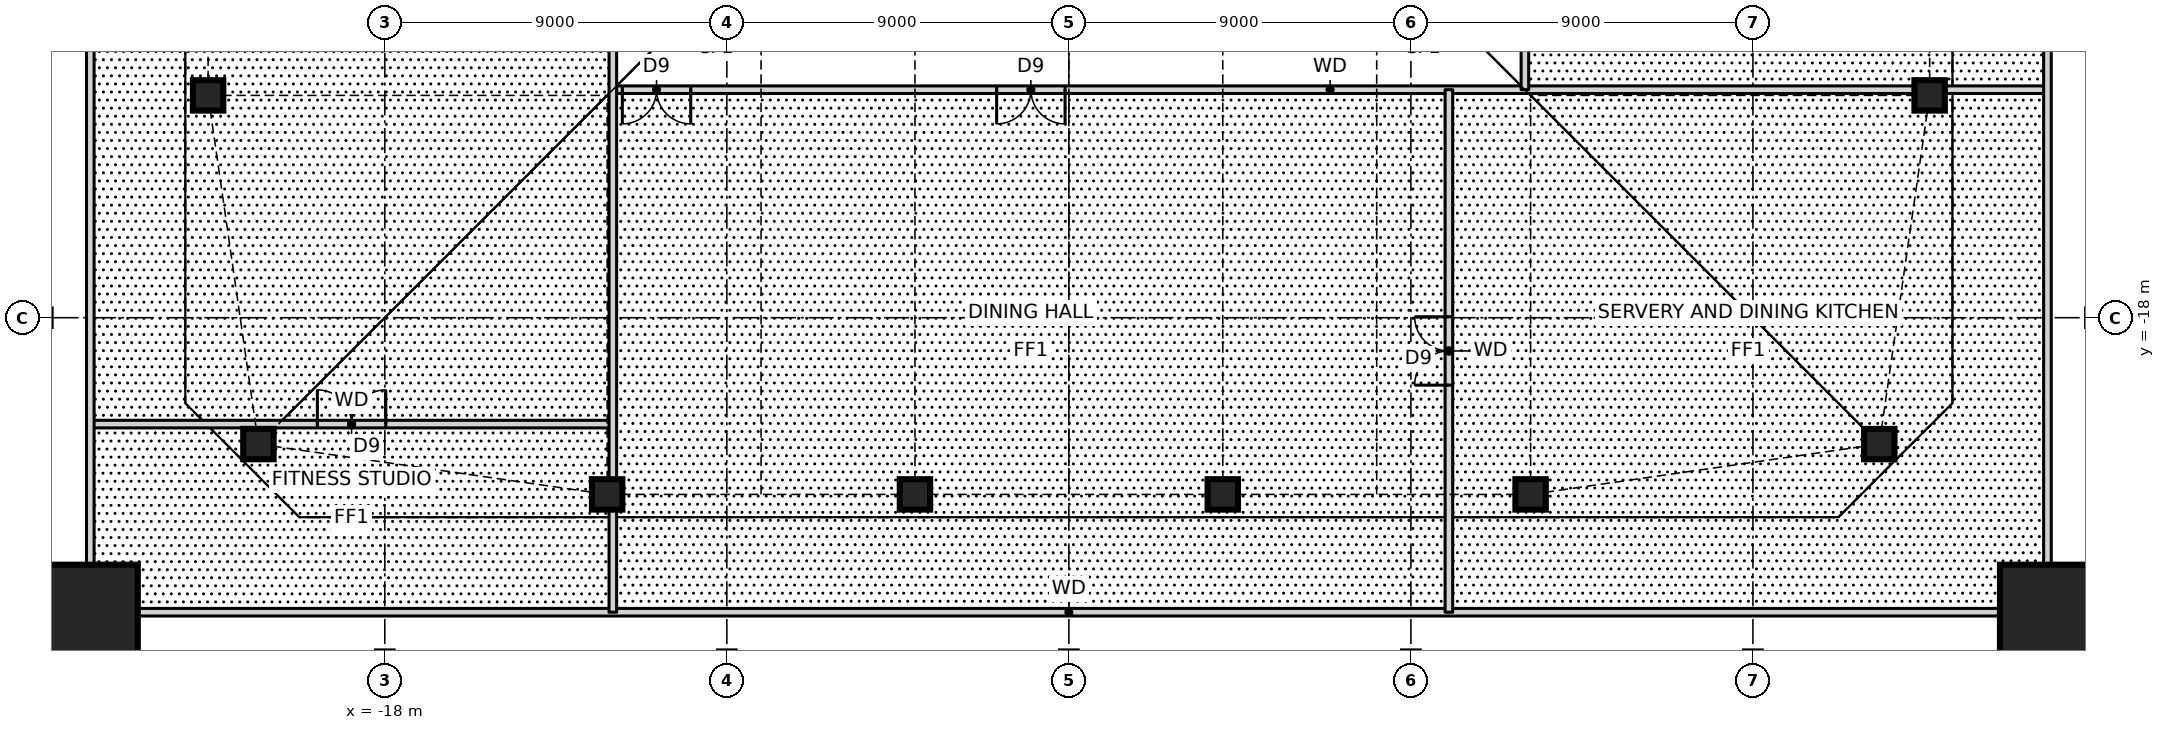
"""IFC4 building model, lengths in metres.
Left out: names, types, materials, properties, quantities, classifications, styles, units other than length and angle.
Written with IfcOpenShell. Run it as: python <this file> out.ifc"""

import sys

from ifc_helpers import new_model, si_unit, direction, frame, frame_2d, origin, origin_2d, place, context, subcontext, project, spatial, rectangle, hollow_rectangle, i_section, extrude, element, fill, save


model = new_model("IFC4")
c1 = context("Model", 3, precision=1e-05, world=origin(), true_north=direction((0.0, 1.0)))
c2 = subcontext(c1, "Body", "Model", "MODEL_VIEW")
j1 = project(units=[si_unit("LENGTHUNIT", "METRE"), si_unit("PLANEANGLEUNIT", "RADIAN")], contexts=[c1])
p1 = place(None, origin())
s1 = spatial("IfcSite", under=j1, at=p1, CompositionType="ELEMENT")
p2 = place(p1, origin())
s2 = spatial("IfcBuilding", under=s1, at=p2, CompositionType="ELEMENT")
p3 = place(p2, frame((0.0, 0.0, 6.0)))
s3 = spatial("IfcBuildingStorey", under=s2, at=p3, CompositionType="ELEMENT", Elevation=6.0)
for number, where, z_axis, x_axis in (
    (1, (-21.326, -21.326, 0.0), (0.0, 0.0, 1.0), (1.0, 0.0, 0.0)),
    (2, (-12.15, -22.65, 0.0), (0.0, 0.0, 1.0), (1.0, 0.0, 0.0)),
    (3, (-4.05, -22.65, 0.0), (0.0, 0.0, 1.0), (1.0, 0.0, 0.0)),
    (4, (4.05, -22.65, 0.0), (0.0, 0.0, 1.0), (1.0, 0.0, 0.0)),
    (5, (12.15, -22.65, 0.0), (0.0, 0.0, 1.0), (1.0, 0.0, 0.0)),
    (6, (21.326, -21.326, 0.0), (0.0, 0.0, 1.0), (1.0, 0.0, 0.0)),
    (7, (22.65, -12.15, 0.0), (0.0, 0.0, 1.0), (1.0, 0.0, 0.0)),
    (8, (-22.65, -12.15, 0.0), (0.0, 0.0, 1.0), (1.0, 0.0, 0.0)),
):
    element("IfcColumn", number, at=place(p3, frame(where, z_axis=z_axis, x_axis=x_axis)), inside=s3, PredefinedType="COLUMN", context=c2, shape_type="SweptSolid", body=[
        extrude(hollow_rectangle(XDim=0.8, YDim=0.8, WallThickness=0.09, at=origin_2d()), origin(), (0.0, 0.0, 1.0), 4.5),
    ])
for number, where, z_axis, x_axis in (
    (9, (-27.0, -27.0, 0.0), (0.0, 0.0, 1.0), (1.0, 0.0, 0.0)),
    (10, (27.0, -27.0, 0.0), (0.0, 0.0, 1.0), (1.0, 0.0, 0.0)),
):
    element("IfcColumn", number, at=place(p3, frame(where, z_axis=z_axis, x_axis=x_axis)), inside=s3, PredefinedType="COLUMN", context=c2, shape_type="SweptSolid", body=[
        extrude(rectangle(XDim=5.0, YDim=5.0, at=origin_2d()), origin(), (0.0, 0.0, 1.0), 4.5),
        extrude(i_section(OverallWidth=0.478, OverallDepth=0.599, WebThickness=0.1, FlangeThickness=0.14, at=origin_2d()), origin(), (0.0, 0.0, 1.0), 4.5),
    ])
p4 = place(p3, frame((-25.75, -25.75, 0.0), z_axis=(0.0, 0.0, 1.0), x_axis=(1.0, 0.0, 0.0)))
e11 = element("IfcWall", 11, at=p4, inside=s3, PredefinedType="SOLIDWALL", context=c2, shape_type="SweptSolid", body=[
    extrude(rectangle(XDim=51.5, YDim=0.2, at=frame_2d((25.75, 0.0))), origin(), (0.0, 0.0, 1.0), 4.25),
])
p5 = place(p3, frame((-25.75, -20.8, 0.0), z_axis=(0.0, 0.0, 1.0), x_axis=(1.0, 0.0, 0.0)))
e12 = element("IfcWall", 12, at=p5, inside=s3, PredefinedType="SOLIDWALL", context=c2, shape_type="SweptSolid", body=[
    extrude(rectangle(XDim=13.75, YDim=0.2, at=frame_2d((6.875, 0.0))), origin(), (0.0, 0.0, 1.0), 4.25),
])
p6 = place(p5, frame((5.975, 0.0, 0.0)))
e13 = element("IfcOpeningElement", 13, at=p6, cuts=e12, PredefinedType="OPENING", context=c2, shape_type="SweptSolid", body=[
    extrude(rectangle(XDim=1.8, YDim=2.1, at=frame_2d((0.9, 1.05))), frame((0.0, 0.11, 0.0), z_axis=(0.0, -1.0, 0.0), x_axis=(1.0, 0.0, 0.0)), (0.0, 0.0, 1.0), 0.22),
])
p7 = place(p3, frame((-12.0, -12.0, 0.0), z_axis=(0.0, 0.0, 1.0), x_axis=(1.0, 0.0, 0.0)))
e14 = element("IfcWall", 14, at=p7, inside=s3, PredefinedType="SOLIDWALL", context=c2, shape_type="SweptSolid", body=[
    extrude(rectangle(XDim=37.75, YDim=0.2, at=frame_2d((18.875, 0.0))), origin(), (0.0, 0.0, 1.0), 4.25),
])
p8 = place(p7, frame((10.1, 0.0, 0.0)))
e15 = element("IfcOpeningElement", 15, at=p8, cuts=e14, PredefinedType="OPENING", context=c2, shape_type="SweptSolid", body=[
    extrude(rectangle(XDim=1.8, YDim=2.1, at=frame_2d((0.9, 1.05))), frame((0.0, 0.11, 0.0), z_axis=(0.0, -1.0, 0.0), x_axis=(1.0, 0.0, 0.0)), (0.0, 0.0, 1.0), 0.22),
])
p9 = place(p7, frame((0.25, 0.0, 0.0)))
e16 = element("IfcOpeningElement", 16, at=p9, cuts=e14, PredefinedType="OPENING", context=c2, shape_type="SweptSolid", body=[
    extrude(rectangle(XDim=1.8, YDim=2.1, at=frame_2d((0.9, 1.05))), frame((0.0, 0.11, 0.0), z_axis=(0.0, -1.0, 0.0), x_axis=(1.0, 0.0, 0.0)), (0.0, 0.0, 1.0), 0.22),
])
p10 = place(p3, frame((25.75, -25.75, 0.0), z_axis=(0.0, 0.0, 1.0), x_axis=(0.0, 1.0, 0.0)))
e17 = element("IfcWall", 17, at=p10, inside=s3, PredefinedType="SOLIDWALL", context=c2, shape_type="SweptSolid", body=[
    extrude(rectangle(XDim=51.5, YDim=0.2, at=frame_2d((25.75, 0.0))), origin(), (0.0, 0.0, 1.0), 4.25),
])
p11 = place(p3, frame((12.0, -12.0, 0.0), z_axis=(0.0, 0.0, 1.0), x_axis=(0.0, 1.0, 0.0)))
e18 = element("IfcWall", 18, at=p11, inside=s3, PredefinedType="SOLIDWALL", context=c2, shape_type="SweptSolid", body=[
    extrude(rectangle(XDim=37.75, YDim=0.2, at=frame_2d((18.875, 0.0))), origin(), (0.0, 0.0, 1.0), 4.25),
])
p12 = place(p11, frame((9.6, 0.0, 0.0)))
e19 = element("IfcOpeningElement", 19, at=p12, cuts=e18, PredefinedType="OPENING", context=c2, shape_type="SweptSolid", body=[
    extrude(rectangle(XDim=1.8, YDim=2.1, at=frame_2d((0.9, 1.05))), frame((0.0, 0.11, 0.0), z_axis=(0.0, -1.0, 0.0), x_axis=(1.0, 0.0, 0.0)), (0.0, 0.0, 1.0), 0.22),
])
p13 = place(p3, frame((10.0, -25.75, 0.0), z_axis=(0.0, 0.0, 1.0), x_axis=(0.0, 1.0, 0.0)))
e20 = element("IfcWall", 20, at=p13, inside=s3, PredefinedType="SOLIDWALL", context=c2, shape_type="SweptSolid", body=[
    extrude(rectangle(XDim=13.75, YDim=0.2, at=frame_2d((6.875, 0.0))), origin(), (0.0, 0.0, 1.0), 4.25),
])
p14 = place(p13, frame((5.975, 0.0, 0.0)))
e21 = element("IfcOpeningElement", 21, at=p14, cuts=e20, PredefinedType="OPENING", context=c2, shape_type="SweptSolid", body=[
    extrude(rectangle(XDim=1.8, YDim=2.1, at=frame_2d((0.9, 1.05))), frame((0.0, 0.11, 0.0), z_axis=(0.0, -1.0, 0.0), x_axis=(1.0, 0.0, 0.0)), (0.0, 0.0, 1.0), 0.22),
])
p15 = place(p3, frame((-12.0, -25.75, 0.0), z_axis=(0.0, 0.0, 1.0), x_axis=(0.0, 1.0, 0.0)))
e22 = element("IfcWall", 22, at=p15, inside=s3, PredefinedType="SOLIDWALL", context=c2, shape_type="SweptSolid", body=[
    extrude(rectangle(XDim=37.75, YDim=0.2, at=frame_2d((18.875, 0.0))), origin(), (0.0, 0.0, 1.0), 4.25),
])
p16 = place(p15, frame((35.7, 0.0, 0.0)))
e23 = element("IfcOpeningElement", 23, at=p16, cuts=e22, PredefinedType="OPENING", context=c2, shape_type="SweptSolid", body=[
    extrude(rectangle(XDim=0.9, YDim=2.1, at=frame_2d((0.45, 1.05))), frame((0.0, 0.11, 0.0), z_axis=(0.0, -1.0, 0.0), x_axis=(1.0, 0.0, 0.0)), (0.0, 0.0, 1.0), 0.22),
])
p17 = place(p15, frame((32.5, 0.0, 0.0)))
e24 = element("IfcOpeningElement", 24, at=p17, cuts=e22, PredefinedType="OPENING", context=c2, shape_type="SweptSolid", body=[
    extrude(rectangle(XDim=0.9, YDim=2.1, at=frame_2d((0.45, 1.05))), frame((0.0, 0.11, 0.0), z_axis=(0.0, -1.0, 0.0), x_axis=(1.0, 0.0, 0.0)), (0.0, 0.0, 1.0), 0.22),
])
p18 = place(p15, frame((29.5, 0.0, 0.0)))
e25 = element("IfcOpeningElement", 25, at=p18, cuts=e22, PredefinedType="OPENING", context=c2, shape_type="SweptSolid", body=[
    extrude(rectangle(XDim=0.9, YDim=2.1, at=frame_2d((0.45, 1.05))), frame((0.0, 0.11, 0.0), z_axis=(0.0, -1.0, 0.0), x_axis=(1.0, 0.0, 0.0)), (0.0, 0.0, 1.0), 0.22),
])
p19 = place(p15, frame((26.35, 0.0, 0.0)))
e26 = element("IfcOpeningElement", 26, at=p19, cuts=e22, PredefinedType="OPENING", context=c2, shape_type="SweptSolid", body=[
    extrude(rectangle(XDim=1.8, YDim=2.1, at=frame_2d((0.9, 1.05))), frame((0.0, 0.11, 0.0), z_axis=(0.0, -1.0, 0.0), x_axis=(1.0, 0.0, 0.0)), (0.0, 0.0, 1.0), 0.22),
])
p20 = place(p15, frame((18.95, 0.0, 0.0)))
e27 = element("IfcOpeningElement", 27, at=p20, cuts=e22, PredefinedType="OPENING", context=c2, shape_type="SweptSolid", body=[
    extrude(rectangle(XDim=1.8, YDim=2.1, at=frame_2d((0.9, 1.05))), frame((0.0, 0.11, 0.0), z_axis=(0.0, -1.0, 0.0), x_axis=(1.0, 0.0, 0.0)), (0.0, 0.0, 1.0), 0.22),
])
p21 = place(p3, frame((-25.75, -25.75, 0.0), z_axis=(0.0, 0.0, 1.0), x_axis=(0.0, 1.0, 0.0)))
e28 = element("IfcWall", 28, at=p21, inside=s3, PredefinedType="SOLIDWALL", context=c2, shape_type="SweptSolid", body=[
    extrude(rectangle(XDim=51.5, YDim=0.2, at=frame_2d((25.75, 0.0))), origin(), (0.0, 0.0, 1.0), 4.25),
])
p22 = place(p8, frame((1.8, 0.0, 0.0), z_axis=(0.0, 0.0, 1.0), x_axis=(-1.0, 0.0, 0.0)))
e29 = element("IfcDoor", 29, at=p22, inside=s3, OperationType="DOUBLE_DOOR_SINGLE_SWING", PredefinedType="DOOR", context=c2, shape_type="SweptSolid", body=[
    extrude(rectangle(XDim=1.8, YDim=2.1, at=frame_2d((0.9, 1.05))), frame((0.0, 0.025, 0.0), z_axis=(0.0, -1.0, 0.0), x_axis=(1.0, 0.0, 0.0)), (0.0, 0.0, 1.0), 0.05),
])
fill(e15, e29)
p23 = place(p9, frame((1.8, 0.0, 0.0), z_axis=(0.0, 0.0, 1.0), x_axis=(-1.0, 0.0, 0.0)))
e30 = element("IfcDoor", 30, at=p23, inside=s3, OperationType="DOUBLE_DOOR_SINGLE_SWING", PredefinedType="DOOR", context=c2, shape_type="SweptSolid", body=[
    extrude(rectangle(XDim=1.8, YDim=2.1, at=frame_2d((0.9, 1.05))), frame((0.0, 0.025, 0.0), z_axis=(0.0, -1.0, 0.0), x_axis=(1.0, 0.0, 0.0)), (0.0, 0.0, 1.0), 0.05),
])
fill(e16, e30)
p24 = place(p14, origin())
e31 = element("IfcDoor", 31, at=p24, inside=s3, OperationType="DOUBLE_DOOR_SINGLE_SWING", PredefinedType="DOOR", context=c2, shape_type="SweptSolid", body=[
    extrude(rectangle(XDim=1.8, YDim=2.1, at=frame_2d((0.9, 1.05))), frame((0.0, 0.025, 0.0), z_axis=(0.0, -1.0, 0.0), x_axis=(1.0, 0.0, 0.0)), (0.0, 0.0, 1.0), 0.05),
])
fill(e21, e31)
p25 = place(p6, origin())
e32 = element("IfcDoor", 32, at=p25, inside=s3, OperationType="DOUBLE_DOOR_SINGLE_SWING", PredefinedType="DOOR", context=c2, shape_type="SweptSolid", body=[
    extrude(rectangle(XDim=1.8, YDim=2.1, at=frame_2d((0.9, 1.05))), frame((0.0, 0.025, 0.0), z_axis=(0.0, -1.0, 0.0), x_axis=(1.0, 0.0, 0.0)), (0.0, 0.0, 1.0), 0.05),
])
fill(e13, e32)
save(model, sys.argv[1])
